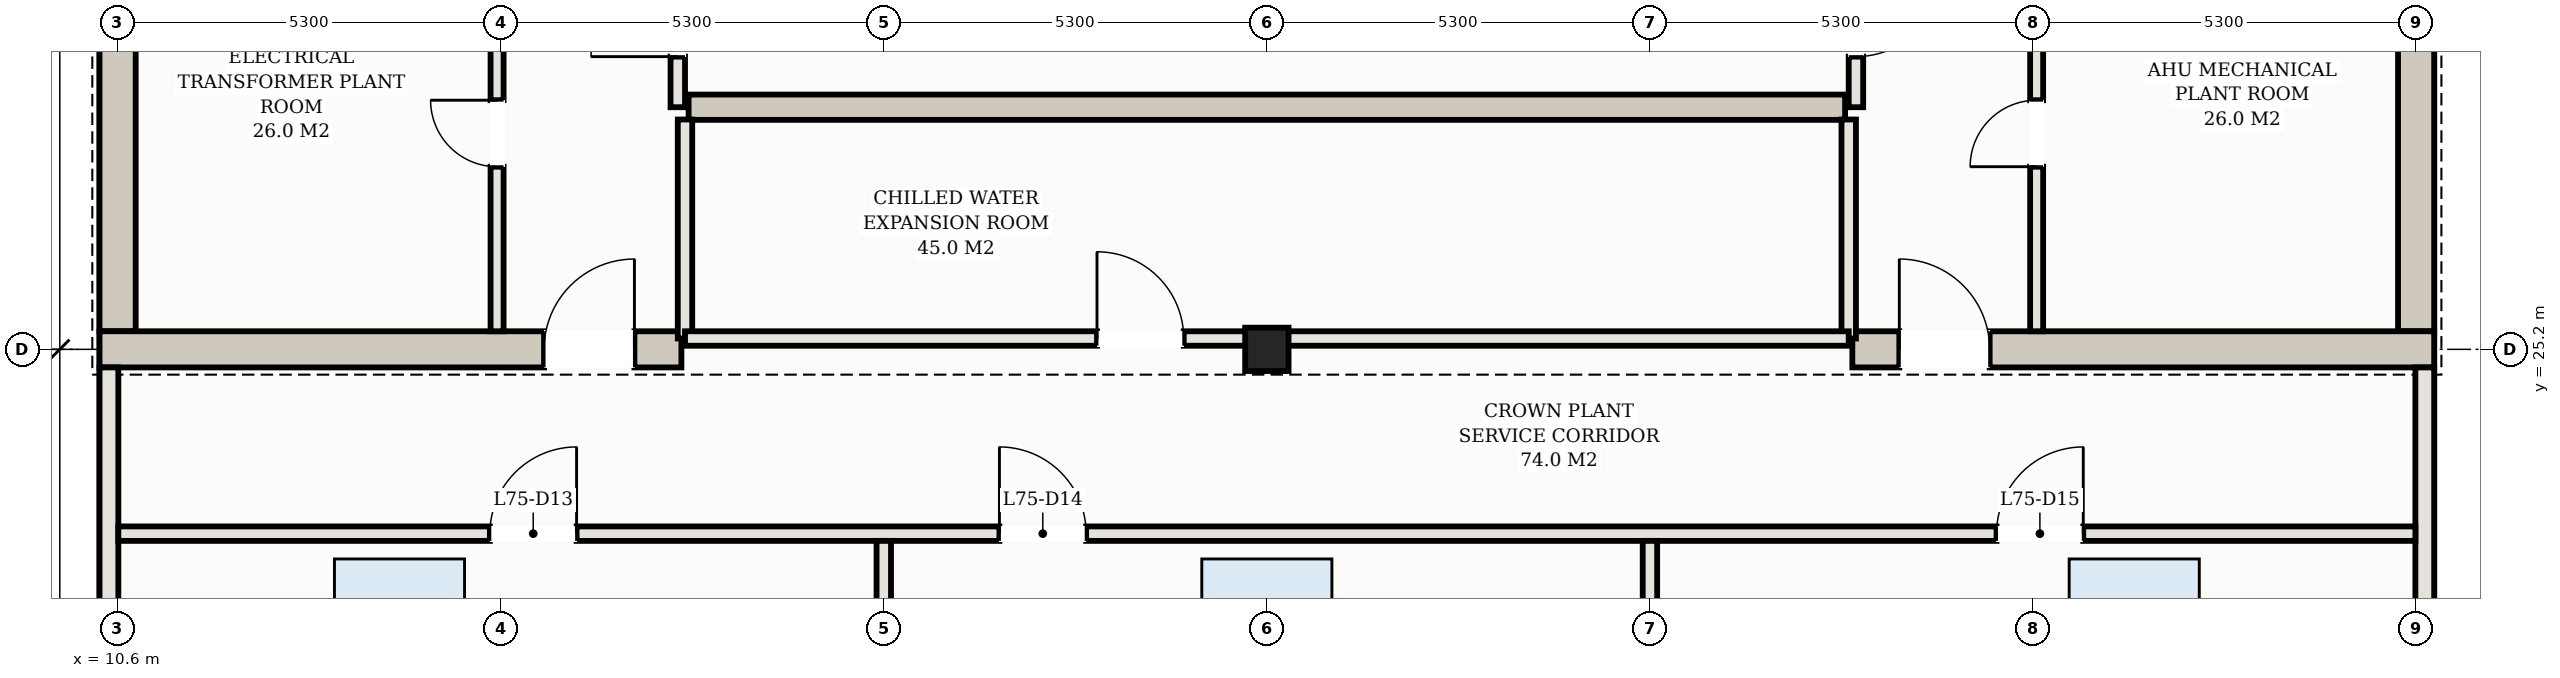
"""IFC4 building model, lengths in metres.
Left out: names, types, materials, properties, quantities, classifications, styles, units other than length and angle.
Written with IfcOpenShell. Run it as: python <this file> out.ifc"""

import sys

from ifc_helpers import new_model, si_unit, direction, frame, frame_2d, origin, origin_2d, place, context, subcontext, project, spatial, rectangle, hollow_rectangle, extrude, element, fill, save


model = new_model("IFC4")
c1 = context("Model", 3, precision=1e-05, world=origin(), true_north=direction((0.0, 1.0)))
c2 = subcontext(c1, "Body", "Model", "MODEL_VIEW")
j1 = project(units=[si_unit("LENGTHUNIT", "METRE"), si_unit("PLANEANGLEUNIT", "RADIAN")], contexts=[c1])
p1 = place(None, origin())
s1 = spatial("IfcSite", under=j1, at=p1, CompositionType="ELEMENT")
p2 = place(p1, origin())
s2 = spatial("IfcBuilding", under=s1, at=p2, CompositionType="ELEMENT")
p3 = place(p2, frame((0.0, 0.0, 270.8)))
s3 = spatial("IfcBuildingStorey", under=s2, at=p3, CompositionType="ELEMENT", Elevation=270.8)
p4 = place(p3, frame((10.6, 25.45, 0.0), z_axis=(0.0, 0.0, 1.0), x_axis=(0.0, 1.0, 0.0)))
e1 = element("IfcWall", 1, at=p4, inside=s3, PredefinedType="SHEAR", context=c2, shape_type="SweptSolid", body=[
    extrude(rectangle(XDim=14.3, YDim=0.5, at=frame_2d((7.15, 0.0))), origin(), (0.0, 0.0, 1.0), 6.239),
])
p5 = place(p3, frame((42.4, 25.45, 0.0), z_axis=(0.0, 0.0, 1.0), x_axis=(0.0, 1.0, 0.0)))
e2 = element("IfcWall", 2, at=p5, inside=s3, PredefinedType="SHEAR", context=c2, shape_type="SweptSolid", body=[
    extrude(rectangle(XDim=14.3, YDim=0.5, at=frame_2d((7.15, 0.0))), origin(), (0.0, 0.0, 1.0), 14.168),
])
p6 = place(p3, frame((10.35, 25.2, 0.0), z_axis=(0.0, 0.0, 1.0), x_axis=(1.0, 0.0, 0.0)))
e3 = element("IfcWall", 3, at=p6, inside=s3, PredefinedType="SHEAR", context=c2, shape_type="SweptSolid", body=[
    extrude(rectangle(XDim=8.05, YDim=0.5, at=frame_2d((4.025, 0.0))), origin(), (0.0, 0.0, 1.0), 6.177),
])
p7 = place(p6, frame((6.15, 0.0, 0.0)))
e4 = element("IfcOpeningElement", 4, at=p7, cuts=e3, PredefinedType="OPENING", context=c2, shape_type="SweptSolid", body=[
    extrude(rectangle(XDim=1.25, YDim=2.2, at=frame_2d((0.625, 1.1))), frame((0.0, 0.26, 0.0), z_axis=(0.0, -1.0, 0.0), x_axis=(1.0, 0.0, 0.0)), (0.0, 0.0, 1.0), 0.52),
])
p8 = place(p3, frame((34.6, 25.2, 0.0), z_axis=(0.0, 0.0, 1.0), x_axis=(1.0, 0.0, 0.0)))
e5 = element("IfcWall", 5, at=p8, inside=s3, PredefinedType="SHEAR", context=c2, shape_type="SweptSolid", body=[
    extrude(rectangle(XDim=8.05, YDim=0.5, at=frame_2d((4.025, 0.0))), origin(), (0.0, 0.0, 1.0), 12.223),
])
p9 = place(p8, frame((0.65, 0.0, 0.0)))
e6 = element("IfcOpeningElement", 6, at=p9, cuts=e5, PredefinedType="OPENING", context=c2, shape_type="SweptSolid", body=[
    extrude(rectangle(XDim=1.25, YDim=2.2, at=frame_2d((0.625, 1.1))), frame((0.0, 0.26, 0.0), z_axis=(0.0, -1.0, 0.0), x_axis=(1.0, 0.0, 0.0)), (0.0, 0.0, 1.0), 0.52),
])
p10 = place(p3, frame((18.5, 28.55, 0.0), z_axis=(0.0, 0.0, 1.0), x_axis=(1.0, 0.0, 0.0)))
e7 = element("IfcWall", 7, at=p10, inside=s3, PredefinedType="SHEAR", context=c2, shape_type="SweptSolid", body=[
    extrude(rectangle(XDim=16.0, YDim=0.35, at=frame_2d((8.0, 0.0))), origin(), (0.0, 0.0, 1.0), 8.209),
])
p11 = place(p3, frame((26.5, 25.2, 0.0), z_axis=(0.0, 0.0, 1.0), x_axis=(1.0, 0.0, 0.0)))
e8 = element("IfcColumn", 8, at=p11, inside=s3, PredefinedType="COLUMN", context=c2, shape_type="SweptSolid", body=[
    extrude(hollow_rectangle(XDim=0.6, YDim=0.6, WallThickness=0.022, at=origin_2d()), origin(), (0.0, 0.0, 1.0), 6.0),
])
for number, where, z_axis, x_axis in (
    (9, (10.48, 24.95, 0.0), (0.0, 0.0, 1.0), (0.0, -1.0, 0.0)),
    (10, (42.52, 17.06, 0.0), (0.0, 0.0, 1.0), (0.0, 1.0, 0.0)),
):
    element("IfcWall", number, at=place(p3, frame(where, z_axis=z_axis, x_axis=x_axis)), inside=s3, PredefinedType="SOLIDWALL", context=c2, shape_type="SweptSolid", body=[
        extrude(rectangle(XDim=7.89, YDim=0.26, at=frame_2d((3.945, 0.0))), origin(), (0.0, 0.0, 1.0), 6.116),
    ])
p12 = place(p3, frame((15.85, 25.45, 0.0), z_axis=(0.0, 0.0, 1.0), x_axis=(0.0, 1.0, 0.0)))
e11 = element("IfcWall", 11, at=p12, inside=s3, PredefinedType="PARTITIONING", context=c2, shape_type="SweptSolid", body=[
    extrude(rectangle(XDim=5.475, YDim=0.18, at=frame_2d((2.738, 0.0))), origin(), (0.0, 0.0, 1.0), 5.98),
])
p13 = place(p12, frame((2.277, 0.0, 0.0)))
e12 = element("IfcOpeningElement", 12, at=p13, cuts=e11, PredefinedType="OPENING", context=c2, shape_type="SweptSolid", body=[
    extrude(rectangle(XDim=0.92, YDim=2.15, at=frame_2d((0.46, 1.075))), frame((0.0, 0.1, 0.0), z_axis=(0.0, -1.0, 0.0), x_axis=(1.0, 0.0, 0.0)), (0.0, 0.0, 1.0), 0.2),
])
p14 = place(p3, frame((37.15, 25.45, 0.0), z_axis=(0.0, 0.0, 1.0), x_axis=(0.0, 1.0, 0.0)))
e13 = element("IfcWall", 13, at=p14, inside=s3, PredefinedType="PARTITIONING", context=c2, shape_type="SweptSolid", body=[
    extrude(rectangle(XDim=5.475, YDim=0.18, at=frame_2d((2.738, 0.0))), origin(), (0.0, 0.0, 1.0), 5.98),
])
p15 = place(p14, frame((2.277, 0.0, 0.0)))
e14 = element("IfcOpeningElement", 14, at=p15, cuts=e13, PredefinedType="OPENING", context=c2, shape_type="SweptSolid", body=[
    extrude(rectangle(XDim=0.92, YDim=2.15, at=frame_2d((0.46, 1.075))), frame((0.0, 0.1, 0.0), z_axis=(0.0, -1.0, 0.0), x_axis=(1.0, 0.0, 0.0)), (0.0, 0.0, 1.0), 0.2),
])
p16 = place(p3, frame((18.35, 28.55, 0.0), z_axis=(0.0, 0.0, 1.0), x_axis=(0.0, 1.0, 0.0)))
e15 = element("IfcWall", 15, at=p16, inside=s3, PredefinedType="PARTITIONING", context=c2, shape_type="SweptSolid", body=[
    extrude(rectangle(XDim=2.6, YDim=0.2, at=frame_2d((1.3, 0.0))), origin(), (0.0, 0.0, 1.0), 5.98),
])
p17 = place(p16, frame((0.7, 0.0, 0.0)))
e16 = element("IfcOpeningElement", 16, at=p17, cuts=e15, PredefinedType="OPENING", context=c2, shape_type="SweptSolid", body=[
    extrude(rectangle(XDim=1.2, YDim=2.2, at=frame_2d((0.6, 1.1))), frame((0.0, 0.11, 0.0), z_axis=(0.0, -1.0, 0.0), x_axis=(1.0, 0.0, 0.0)), (0.0, 0.0, 1.0), 0.22),
])
p18 = place(p3, frame((34.65, 28.55, 0.0), z_axis=(0.0, 0.0, 1.0), x_axis=(0.0, 1.0, 0.0)))
e17 = element("IfcWall", 17, at=p18, inside=s3, PredefinedType="PARTITIONING", context=c2, shape_type="SweptSolid", body=[
    extrude(rectangle(XDim=2.6, YDim=0.2, at=frame_2d((1.3, 0.0))), origin(), (0.0, 0.0, 1.0), 5.98),
])
p19 = place(p18, frame((0.7, 0.0, 0.0)))
e18 = element("IfcOpeningElement", 18, at=p19, cuts=e17, PredefinedType="OPENING", context=c2, shape_type="SweptSolid", body=[
    extrude(rectangle(XDim=1.2, YDim=2.2, at=frame_2d((0.6, 1.1))), frame((0.0, 0.11, 0.0), z_axis=(0.0, -1.0, 0.0), x_axis=(1.0, 0.0, 0.0)), (0.0, 0.0, 1.0), 0.22),
])
p20 = place(p3, frame((10.61, 22.65, 0.0), z_axis=(0.0, 0.0, 1.0), x_axis=(1.0, 0.0, 0.0)))
e19 = element("IfcWall", 19, at=p20, inside=s3, PredefinedType="PARTITIONING", context=c2, shape_type="SweptSolid", body=[
    extrude(rectangle(XDim=31.78, YDim=0.2, at=frame_2d((15.89, 0.0))), origin(), (0.0, 0.0, 1.0), 3.6),
])
p21 = place(p20, frame((5.14, 0.0, 0.0)))
e20 = element("IfcOpeningElement", 20, at=p21, cuts=e19, PredefinedType="OPENING", context=c2, shape_type="SweptSolid", body=[
    extrude(rectangle(XDim=1.2, YDim=2.2, at=frame_2d((0.6, 1.1))), frame((0.0, 0.11, 0.0), z_axis=(0.0, -1.0, 0.0), x_axis=(1.0, 0.0, 0.0)), (0.0, 0.0, 1.0), 0.22),
])
p22 = place(p20, frame((12.19, 0.0, 0.0)))
e21 = element("IfcOpeningElement", 21, at=p22, cuts=e19, PredefinedType="OPENING", context=c2, shape_type="SweptSolid", body=[
    extrude(rectangle(XDim=1.2, YDim=2.2, at=frame_2d((0.6, 1.1))), frame((0.0, 0.11, 0.0), z_axis=(0.0, -1.0, 0.0), x_axis=(1.0, 0.0, 0.0)), (0.0, 0.0, 1.0), 0.22),
])
p23 = place(p20, frame((25.985, 0.0, 0.0)))
e22 = element("IfcOpeningElement", 22, at=p23, cuts=e19, PredefinedType="OPENING", context=c2, shape_type="SweptSolid", body=[
    extrude(rectangle(XDim=1.2, YDim=2.2, at=frame_2d((0.6, 1.1))), frame((0.0, 0.11, 0.0), z_axis=(0.0, -1.0, 0.0), x_axis=(1.0, 0.0, 0.0)), (0.0, 0.0, 1.0), 0.22),
])
for number, where, z_axis, x_axis in (
    (23, (21.2, 17.06, 0.0), (0.0, 0.0, 1.0), (0.0, 1.0, 0.0)),
    (24, (31.8, 17.06, 0.0), (0.0, 0.0, 1.0), (0.0, 1.0, 0.0)),
):
    element("IfcWall", number, at=place(p3, frame(where, z_axis=z_axis, x_axis=x_axis)), inside=s3, PredefinedType="PARTITIONING", context=c2, shape_type="SweptSolid", body=[
        extrude(rectangle(XDim=5.49, YDim=0.2, at=frame_2d((2.745, 0.0))), origin(), (0.0, 0.0, 1.0), 3.6),
    ])
for number, where, z_axis, x_axis in (
    (25, (18.45, 25.35, 0.0), (0.0, 0.0, 1.0), (0.0, 1.0, 0.0)),
    (26, (34.55, 25.35, 0.0), (0.0, 0.0, 1.0), (0.0, 1.0, 0.0)),
):
    element("IfcWall", number, at=place(p3, frame(where, z_axis=z_axis, x_axis=x_axis)), inside=s3, PredefinedType="PARTITIONING", context=c2, shape_type="SweptSolid", body=[
        extrude(rectangle(XDim=3.03, YDim=0.2, at=frame_2d((1.515, 0.0))), origin(), (0.0, 0.0, 1.0), 3.6),
    ])
p24 = place(p3, frame((18.45, 25.35, 0.0), z_axis=(0.0, 0.0, 1.0), x_axis=(1.0, 0.0, 0.0)))
e27 = element("IfcWall", 27, at=p24, inside=s3, PredefinedType="PARTITIONING", context=c2, shape_type="SweptSolid", body=[
    extrude(rectangle(XDim=16.1, YDim=0.2, at=frame_2d((8.05, 0.0))), origin(), (0.0, 0.0, 1.0), 3.6),
])
p25 = place(p24, frame((5.7, 0.0, 0.0)))
e28 = element("IfcOpeningElement", 28, at=p25, cuts=e27, PredefinedType="OPENING", context=c2, shape_type="SweptSolid", body=[
    extrude(rectangle(XDim=1.2, YDim=2.2, at=frame_2d((0.6, 1.1))), frame((0.0, 0.11, 0.0), z_axis=(0.0, -1.0, 0.0), x_axis=(1.0, 0.0, 0.0)), (0.0, 0.0, 1.0), 0.22),
])
p26 = place(p3, frame((0.0, 0.0, -0.28)))
p27 = place(p26, frame((14.5, 21.0, 0.23)))
e29 = element("IfcWindow", 29, at=p27, inside=s3, PartitioningType="SINGLE_PANEL", PredefinedType="SKYLIGHT", context=c2, shape_type="SweptSolid", body=[
    extrude(rectangle(XDim=1.8, YDim=2.6, at=origin_2d()), origin(), (0.0, 0.0, 1.0), 0.05),
])
p28 = place(p26, frame((26.5, 21.0, 0.23)))
e30 = element("IfcWindow", 30, at=p28, inside=s3, PartitioningType="SINGLE_PANEL", PredefinedType="SKYLIGHT", context=c2, shape_type="SweptSolid", body=[
    extrude(rectangle(XDim=1.8, YDim=2.6, at=origin_2d()), origin(), (0.0, 0.0, 1.0), 0.05),
])
p29 = place(p26, frame((38.5, 21.0, 0.23)))
e31 = element("IfcWindow", 31, at=p29, inside=s3, PartitioningType="SINGLE_PANEL", PredefinedType="SKYLIGHT", context=c2, shape_type="SweptSolid", body=[
    extrude(rectangle(XDim=1.8, YDim=2.6, at=origin_2d()), origin(), (0.0, 0.0, 1.0), 0.05),
])
p30 = place(p7, origin())
e32 = element("IfcDoor", 32, at=p30, inside=s3, OperationType="SINGLE_SWING_RIGHT", PredefinedType="DOOR", context=c2, shape_type="SweptSolid", body=[
    extrude(rectangle(XDim=1.25, YDim=2.2, at=frame_2d((0.625, 1.1))), frame((0.0, 0.025, 0.0), z_axis=(0.0, -1.0, 0.0), x_axis=(1.0, 0.0, 0.0)), (0.0, 0.0, 1.0), 0.05),
])
fill(e4, e32)
p31 = place(p9, origin())
e33 = element("IfcDoor", 33, at=p31, inside=s3, OperationType="SINGLE_SWING_LEFT", PredefinedType="DOOR", context=c2, shape_type="SweptSolid", body=[
    extrude(rectangle(XDim=1.25, YDim=2.2, at=frame_2d((0.625, 1.1))), frame((0.0, 0.025, 0.0), z_axis=(0.0, -1.0, 0.0), x_axis=(1.0, 0.0, 0.0)), (0.0, 0.0, 1.0), 0.05),
])
fill(e6, e33)
p32 = place(p13, origin())
e34 = element("IfcDoor", 34, at=p32, inside=s3, OperationType="SINGLE_SWING_RIGHT", PredefinedType="DOOR", context=c2, shape_type="SweptSolid", body=[
    extrude(rectangle(XDim=0.92, YDim=2.15, at=frame_2d((0.46, 1.075))), frame((0.0, 0.025, 0.0), z_axis=(0.0, -1.0, 0.0), x_axis=(1.0, 0.0, 0.0)), (0.0, 0.0, 1.0), 0.05),
])
fill(e12, e34)
p33 = place(p15, origin())
e35 = element("IfcDoor", 35, at=p33, inside=s3, OperationType="SINGLE_SWING_LEFT", PredefinedType="DOOR", context=c2, shape_type="SweptSolid", body=[
    extrude(rectangle(XDim=0.92, YDim=2.15, at=frame_2d((0.46, 1.075))), frame((0.0, 0.025, 0.0), z_axis=(0.0, -1.0, 0.0), x_axis=(1.0, 0.0, 0.0)), (0.0, 0.0, 1.0), 0.05),
])
fill(e14, e35)
p34 = place(p17, origin())
e36 = element("IfcDoor", 36, at=p34, inside=s3, OperationType="SINGLE_SWING_LEFT", PredefinedType="DOOR", context=c2, shape_type="SweptSolid", body=[
    extrude(rectangle(XDim=1.2, YDim=2.2, at=frame_2d((0.6, 1.1))), frame((0.0, 0.025, 0.0), z_axis=(0.0, -1.0, 0.0), x_axis=(1.0, 0.0, 0.0)), (0.0, 0.0, 1.0), 0.05),
])
fill(e16, e36)
p35 = place(p19, frame((1.2, 0.0, 0.0), z_axis=(0.0, 0.0, 1.0), x_axis=(-1.0, 0.0, 0.0)))
e37 = element("IfcDoor", 37, at=p35, inside=s3, OperationType="SINGLE_SWING_LEFT", PredefinedType="DOOR", context=c2, shape_type="SweptSolid", body=[
    extrude(rectangle(XDim=1.2, YDim=2.2, at=frame_2d((0.6, 1.1))), frame((0.0, 0.025, 0.0), z_axis=(0.0, -1.0, 0.0), x_axis=(1.0, 0.0, 0.0)), (0.0, 0.0, 1.0), 0.05),
])
fill(e18, e37)
p36 = place(p21, origin())
e38 = element("IfcDoor", 38, at=p36, inside=s3, OperationType="SINGLE_SWING_RIGHT", PredefinedType="DOOR", context=c2, shape_type="SweptSolid", body=[
    extrude(rectangle(XDim=1.2, YDim=2.2, at=frame_2d((0.6, 1.1))), frame((0.0, 0.025, 0.0), z_axis=(0.0, -1.0, 0.0), x_axis=(1.0, 0.0, 0.0)), (0.0, 0.0, 1.0), 0.05),
])
fill(e20, e38)
p37 = place(p22, origin())
e39 = element("IfcDoor", 39, at=p37, inside=s3, OperationType="SINGLE_SWING_LEFT", PredefinedType="DOOR", context=c2, shape_type="SweptSolid", body=[
    extrude(rectangle(XDim=1.2, YDim=2.2, at=frame_2d((0.6, 1.1))), frame((0.0, 0.025, 0.0), z_axis=(0.0, -1.0, 0.0), x_axis=(1.0, 0.0, 0.0)), (0.0, 0.0, 1.0), 0.05),
])
fill(e21, e39)
p38 = place(p23, origin())
e40 = element("IfcDoor", 40, at=p38, inside=s3, OperationType="SINGLE_SWING_RIGHT", PredefinedType="DOOR", context=c2, shape_type="SweptSolid", body=[
    extrude(rectangle(XDim=1.2, YDim=2.2, at=frame_2d((0.6, 1.1))), frame((0.0, 0.025, 0.0), z_axis=(0.0, -1.0, 0.0), x_axis=(1.0, 0.0, 0.0)), (0.0, 0.0, 1.0), 0.05),
])
fill(e22, e40)
p39 = place(p25, origin())
e41 = element("IfcDoor", 41, at=p39, inside=s3, OperationType="SINGLE_SWING_LEFT", PredefinedType="DOOR", context=c2, shape_type="SweptSolid", body=[
    extrude(rectangle(XDim=1.2, YDim=2.2, at=frame_2d((0.6, 1.1))), frame((0.0, 0.025, 0.0), z_axis=(0.0, -1.0, 0.0), x_axis=(1.0, 0.0, 0.0)), (0.0, 0.0, 1.0), 0.05),
])
fill(e28, e41)
save(model, sys.argv[1])
